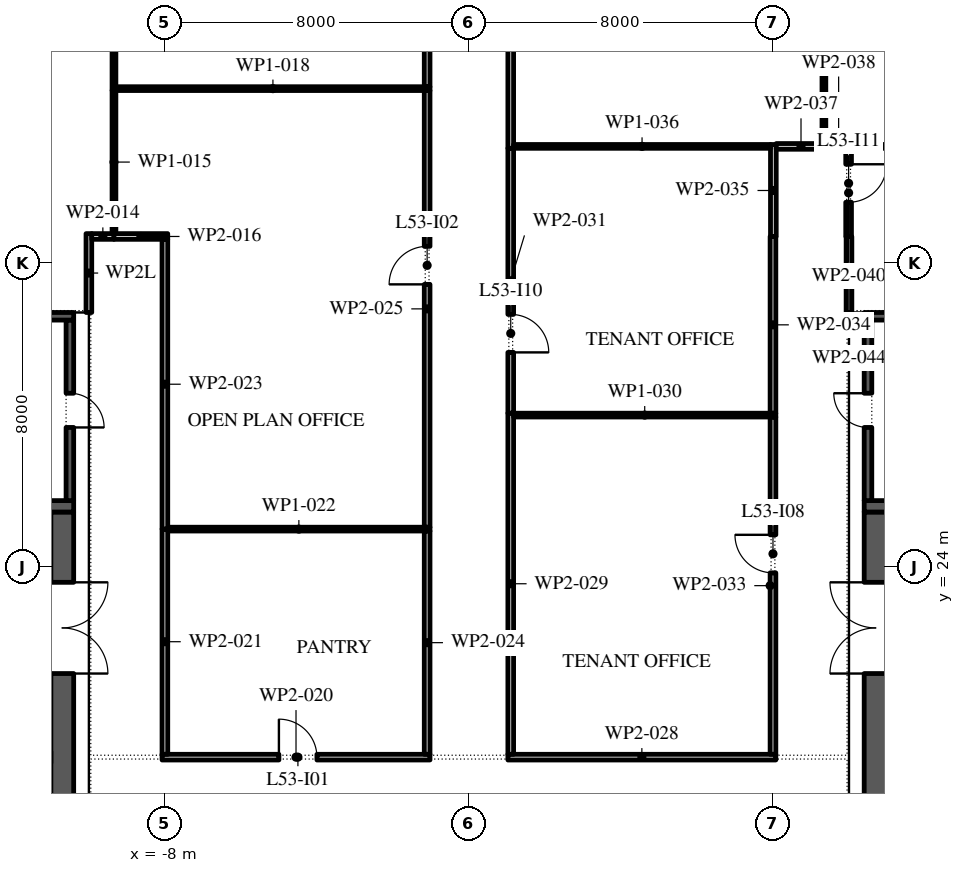
"""IFC4 building model, lengths in metres.
Left out: names, types, materials, properties, quantities, classifications, styles, units other than length and angle.
Written with IfcOpenShell. Run it as: python <this file> out.ifc"""

import sys

from ifc_helpers import new_model, si_unit, direction, frame, frame_2d, origin, place, context, subcontext, project, spatial, rectangle, extrude, element, fill, save


model = new_model("IFC4")
c1 = context("Model", 3, precision=1e-05, world=origin(), true_north=direction((0.0, 1.0)))
c2 = subcontext(c1, "Body", "Model", "MODEL_VIEW")
j1 = project(units=[si_unit("LENGTHUNIT", "METRE"), si_unit("PLANEANGLEUNIT", "RADIAN")], contexts=[c1])
p1 = place(None, origin())
s1 = spatial("IfcSite", under=j1, at=p1, CompositionType="ELEMENT")
p2 = place(p1, origin())
s2 = spatial("IfcBuilding", under=s1, at=p2, CompositionType="ELEMENT")
p3 = place(p2, frame((0.0, 0.0, 247.2)))
s3 = spatial("IfcBuildingStorey", under=s2, at=p3, CompositionType="ELEMENT", Elevation=247.2)
p4 = place(p3, frame((-10.7, -2.45, 0.0), z_axis=(0.0, 0.0, 1.0), x_axis=(0.0, 1.0, 0.0)))
e1 = element("IfcWall", 1, at=p4, inside=s3, PredefinedType="SHEAR", context=c2, shape_type="SweptSolid", body=[
    extrude(rectangle(XDim=27.9, YDim=0.6, at=frame_2d((13.95, 0.0))), origin(), (0.0, 0.0, 1.0), 4.0),
])
p5 = place(p4, frame((23.65, 0.0, 0.0)))
e2 = element("IfcOpeningElement", 2, at=p5, cuts=e1, PredefinedType="OPENING", context=c2, shape_type="SweptSolid", body=[
    extrude(rectangle(XDim=2.4, YDim=2.1, at=frame_2d((1.2, 1.05))), frame((0.0, 0.31, 0.0), z_axis=(0.0, -1.0, 0.0), x_axis=(1.0, 0.0, 0.0)), (0.0, 0.0, 1.0), 0.62),
])
p6 = place(p4, frame((1.087, 0.0, 0.0)))
e3 = element("IfcOpeningElement", 3, at=p6, cuts=e1, PredefinedType="OPENING", context=c2, shape_type="SweptSolid", body=[
    extrude(rectangle(XDim=0.9, YDim=2.1, at=frame_2d((0.45, 1.05))), frame((0.0, 0.31, 0.0), z_axis=(0.0, -1.0, 0.0), x_axis=(1.0, 0.0, 0.0)), (0.0, 0.0, 1.0), 0.62),
])
p7 = place(p4, frame((4.262, 0.0, 0.0)))
e4 = element("IfcOpeningElement", 4, at=p7, cuts=e1, PredefinedType="OPENING", context=c2, shape_type="SweptSolid", body=[
    extrude(rectangle(XDim=1.0, YDim=2.1, at=frame_2d((0.5, 1.05))), frame((0.0, 0.31, 0.0), z_axis=(0.0, -1.0, 0.0), x_axis=(1.0, 0.0, 0.0)), (0.0, 0.0, 1.0), 0.62),
])
p8 = place(p3, frame((-21.6, 25.6, 0.0), z_axis=(0.0, 0.0, 1.0), x_axis=(1.0, 0.0, 0.0)))
e5 = element("IfcWall", 5, at=p8, inside=s3, PredefinedType="SHEAR", context=c2, shape_type="SweptSolid", body=[
    extrude(rectangle(XDim=11.2, YDim=0.3, at=frame_2d((5.6, 0.0))), origin(), (0.0, 0.0, 1.0), 4.0),
])
p9 = place(p3, frame((-10.5, 25.75, 0.0), z_axis=(0.0, 0.0, 1.0), x_axis=(0.0, 1.0, 0.0)))
e6 = element("IfcWall", 6, at=p9, inside=s3, PredefinedType="SHEAR", context=c2, shape_type="SweptSolid", body=[
    extrude(rectangle(XDim=4.75, YDim=0.2, at=frame_2d((2.375, 0.0))), origin(), (0.0, 0.0, 1.0), 4.0),
])
p10 = place(p9, frame((1.925, 0.0, 0.0)))
e7 = element("IfcOpeningElement", 7, at=p10, cuts=e6, PredefinedType="OPENING", context=c2, shape_type="SweptSolid", body=[
    extrude(rectangle(XDim=0.9, YDim=2.1, at=frame_2d((0.45, 1.05))), frame((0.0, 0.11, 0.0), z_axis=(0.0, -1.0, 0.0), x_axis=(1.0, 0.0, 0.0)), (0.0, 0.0, 1.0), 0.22),
])
p11 = place(p3, frame((-21.6, 30.6, 0.0), z_axis=(0.0, 0.0, 1.0), x_axis=(1.0, 0.0, 0.0)))
e8 = element("IfcWall", 8, at=p11, inside=s3, PredefinedType="SHEAR", context=c2, shape_type="SweptSolid", body=[
    extrude(rectangle(XDim=11.2, YDim=0.2, at=frame_2d((5.6, 0.0))), origin(), (0.0, 0.0, 1.0), 4.0),
])
p12 = place(p3, frame((10.7, -2.45, 0.0), z_axis=(0.0, 0.0, 1.0), x_axis=(0.0, 1.0, 0.0)))
e9 = element("IfcWall", 9, at=p12, inside=s3, PredefinedType="SHEAR", context=c2, shape_type="SweptSolid", body=[
    extrude(rectangle(XDim=27.9, YDim=0.6, at=frame_2d((13.95, 0.0))), origin(), (0.0, 0.0, 1.0), 4.0),
])
p13 = place(p12, frame((23.65, 0.0, 0.0)))
e10 = element("IfcOpeningElement", 10, at=p13, cuts=e9, PredefinedType="OPENING", context=c2, shape_type="SweptSolid", body=[
    extrude(rectangle(XDim=2.4, YDim=2.1, at=frame_2d((1.2, 1.05))), frame((0.0, 0.31, 0.0), z_axis=(0.0, -1.0, 0.0), x_axis=(1.0, 0.0, 0.0)), (0.0, 0.0, 1.0), 0.62),
])
p14 = place(p12, frame((1.087, 0.0, 0.0)))
e11 = element("IfcOpeningElement", 11, at=p14, cuts=e9, PredefinedType="OPENING", context=c2, shape_type="SweptSolid", body=[
    extrude(rectangle(XDim=0.9, YDim=2.1, at=frame_2d((0.45, 1.05))), frame((0.0, 0.31, 0.0), z_axis=(0.0, -1.0, 0.0), x_axis=(1.0, 0.0, 0.0)), (0.0, 0.0, 1.0), 0.62),
])
p15 = place(p12, frame((4.262, 0.0, 0.0)))
e12 = element("IfcOpeningElement", 12, at=p15, cuts=e9, PredefinedType="OPENING", context=c2, shape_type="SweptSolid", body=[
    extrude(rectangle(XDim=1.0, YDim=2.1, at=frame_2d((0.5, 1.05))), frame((0.0, 0.31, 0.0), z_axis=(0.0, -1.0, 0.0), x_axis=(1.0, 0.0, 0.0)), (0.0, 0.0, 1.0), 0.62),
])
p16 = place(p3, frame((10.4, 25.6, 0.0), z_axis=(0.0, 0.0, 1.0), x_axis=(1.0, 0.0, 0.0)))
e13 = element("IfcWall", 13, at=p16, inside=s3, PredefinedType="SHEAR", context=c2, shape_type="SweptSolid", body=[
    extrude(rectangle(XDim=11.2, YDim=0.3, at=frame_2d((5.6, 0.0))), origin(), (0.0, 0.0, 1.0), 4.0),
])
p17 = place(p3, frame((10.5, 25.75, 0.0), z_axis=(0.0, 0.0, 1.0), x_axis=(0.0, 1.0, 0.0)))
e14 = element("IfcWall", 14, at=p17, inside=s3, PredefinedType="SHEAR", context=c2, shape_type="SweptSolid", body=[
    extrude(rectangle(XDim=4.75, YDim=0.2, at=frame_2d((2.375, 0.0))), origin(), (0.0, 0.0, 1.0), 4.0),
])
p18 = place(p17, frame((1.925, 0.0, 0.0)))
e15 = element("IfcOpeningElement", 15, at=p18, cuts=e14, PredefinedType="OPENING", context=c2, shape_type="SweptSolid", body=[
    extrude(rectangle(XDim=0.9, YDim=2.1, at=frame_2d((0.45, 1.05))), frame((0.0, 0.11, 0.0), z_axis=(0.0, -1.0, 0.0), x_axis=(1.0, 0.0, 0.0)), (0.0, 0.0, 1.0), 0.22),
])
p19 = place(p3, frame((10.4, 30.6, 0.0), z_axis=(0.0, 0.0, 1.0), x_axis=(1.0, 0.0, 0.0)))
e16 = element("IfcWall", 16, at=p19, inside=s3, PredefinedType="SHEAR", context=c2, shape_type="SweptSolid", body=[
    extrude(rectangle(XDim=11.2, YDim=0.2, at=frame_2d((5.6, 0.0))), origin(), (0.0, 0.0, 1.0), 4.0),
])
p20 = place(p3, frame((-10.0, 30.7, 0.0), z_axis=(0.0, 0.0, 1.0), x_axis=(0.0, 1.0, 0.0)))
e17 = element("IfcWall", 17, at=p20, inside=s3, PredefinedType="PARTITIONING", context=c2, shape_type="SweptSolid", body=[
    extrude(rectangle(XDim=2.075, YDim=0.15, at=frame_2d((1.038, 0.0))), origin(), (0.0, 0.0, 1.0), 3.02),
])
p21 = place(p3, frame((-9.925, 32.7, 0.0), z_axis=(0.0, 0.0, 1.0), x_axis=(1.0, 0.0, 0.0)))
e18 = element("IfcWall", 18, at=p21, inside=s3, PredefinedType="PARTITIONING", context=c2, shape_type="SweptSolid", body=[
    extrude(rectangle(XDim=0.585, YDim=0.15, at=frame_2d((0.292, 0.0))), origin(), (0.0, 0.0, 1.0), 4.0),
])
p22 = place(p3, frame((-9.34, 32.775, 0.0), z_axis=(0.0, 0.0, 1.0), x_axis=(0.0, 1.0, 0.0)))
e19 = element("IfcWall", 19, at=p22, inside=s3, PredefinedType="PARTITIONING", context=c2, shape_type="SweptSolid", body=[
    extrude(rectangle(XDim=3.765, YDim=0.1, at=frame_2d((1.883, 0.0))), origin(), (0.0, 0.0, 1.0), 4.0),
])
p23 = place(p3, frame((-9.34, 32.7, 0.0), z_axis=(0.0, 0.0, 1.0), x_axis=(1.0, 0.0, 0.0)))
e20 = element("IfcWall", 20, at=p23, inside=s3, PredefinedType="PARTITIONING", context=c2, shape_type="SweptSolid", body=[
    extrude(rectangle(XDim=1.415, YDim=0.15, at=frame_2d((0.708, 0.0))), origin(), (0.0, 0.0, 1.0), 4.0),
])
p24 = place(p3, frame((-9.34, 36.54, 0.0), z_axis=(0.0, 0.0, 1.0), x_axis=(0.0, 1.0, 0.0)))
e21 = element("IfcWall", 21, at=p24, inside=s3, PredefinedType="PARTITIONING", context=c2, shape_type="SweptSolid", body=[
    extrude(rectangle(XDim=5.41, YDim=0.1, at=frame_2d((2.705, 0.0))), origin(), (0.0, 0.0, 1.0), 4.0),
])
p25 = place(p3, frame((-9.29, 36.59, 0.0), z_axis=(0.0, 0.0, 1.0), x_axis=(1.0, 0.0, 0.0)))
e22 = element("IfcWall", 22, at=p25, inside=s3, PredefinedType="PARTITIONING", context=c2, shape_type="SweptSolid", body=[
    extrude(rectangle(XDim=8.265, YDim=0.1, at=frame_2d((4.133, 0.0))), origin(), (0.0, 0.0, 1.0), 4.0),
])
p26 = place(p3, frame((-8.075, 19.0, 0.0), z_axis=(0.0, 0.0, 1.0), x_axis=(1.0, 0.0, 0.0)))
e23 = element("IfcWall", 23, at=p26, inside=s3, PredefinedType="PARTITIONING", context=c2, shape_type="SweptSolid", body=[
    extrude(rectangle(XDim=7.05, YDim=0.15, at=frame_2d((3.525, 0.0))), origin(), (0.0, 0.0, 1.0), 4.0),
])
p27 = place(p26, frame((3.075, 0.0, 0.0)))
e24 = element("IfcOpeningElement", 24, at=p27, cuts=e23, PredefinedType="OPENING", context=c2, shape_type="SweptSolid", body=[
    extrude(rectangle(XDim=1.0, YDim=2.1, at=frame_2d((0.5, 1.05))), frame((0.0, 0.085, 0.0), z_axis=(0.0, -1.0, 0.0), x_axis=(1.0, 0.0, 0.0)), (0.0, 0.0, 1.0), 0.17),
])
p28 = place(p3, frame((-8.0, 25.0, 0.0), z_axis=(0.0, 0.0, 1.0), x_axis=(0.0, -1.0, 0.0)))
e25 = element("IfcWall", 25, at=p28, inside=s3, PredefinedType="PARTITIONING", context=c2, shape_type="SweptSolid", body=[
    extrude(rectangle(XDim=5.925, YDim=0.15, at=frame_2d((2.962, 0.0))), origin(), (0.0, 0.0, 1.0), 4.0),
])
p29 = place(p3, frame((-7.925, 25.0, 0.0), z_axis=(0.0, 0.0, 1.0), x_axis=(1.0, 0.0, 0.0)))
e26 = element("IfcWall", 26, at=p29, inside=s3, PredefinedType="PARTITIONING", context=c2, shape_type="SweptSolid", body=[
    extrude(rectangle(XDim=6.9, YDim=0.1, at=frame_2d((3.45, 0.0))), origin(), (0.0, 0.0, 1.0), 4.0),
])
p30 = place(p3, frame((-8.0, 32.625, 0.0), z_axis=(0.0, 0.0, 1.0), x_axis=(0.0, -1.0, 0.0)))
e27 = element("IfcWall", 27, at=p30, inside=s3, PredefinedType="PARTITIONING", context=c2, shape_type="SweptSolid", body=[
    extrude(rectangle(XDim=7.625, YDim=0.15, at=frame_2d((3.812, 0.0))), origin(), (0.0, 0.0, 1.0), 4.0),
])
p31 = place(p3, frame((-1.1, 19.075, 0.0), z_axis=(0.0, 0.0, 1.0), x_axis=(0.0, 1.0, 0.0)))
e28 = element("IfcWall", 28, at=p31, inside=s3, PredefinedType="PARTITIONING", context=c2, shape_type="SweptSolid", body=[
    extrude(rectangle(XDim=5.875, YDim=0.15, at=frame_2d((2.938, 0.0))), origin(), (0.0, 0.0, 1.0), 4.0),
])
p32 = place(p3, frame((-1.1, 25.05, 0.0), z_axis=(0.0, 0.0, 1.0), x_axis=(0.0, 1.0, 0.0)))
e29 = element("IfcWall", 29, at=p32, inside=s3, PredefinedType="PARTITIONING", context=c2, shape_type="SweptSolid", body=[
    extrude(rectangle(XDim=11.49, YDim=0.15, at=frame_2d((5.745, 0.0))), origin(), (0.0, 0.0, 1.0), 4.0),
])
p33 = place(p32, frame((6.39, 0.0, 0.0)))
e30 = element("IfcOpeningElement", 30, at=p33, cuts=e29, PredefinedType="OPENING", context=c2, shape_type="SweptSolid", body=[
    extrude(rectangle(XDim=1.0, YDim=2.1, at=frame_2d((0.5, 1.05))), frame((0.0, 0.085, 0.0), z_axis=(0.0, -1.0, 0.0), x_axis=(1.0, 0.0, 0.0)), (0.0, 0.0, 1.0), 0.17),
])
p34 = place(p3, frame((-1.1, 36.64, 0.0), z_axis=(0.0, 0.0, 1.0), x_axis=(0.0, 1.0, 0.0)))
e31 = element("IfcWall", 31, at=p34, inside=s3, PredefinedType="PARTITIONING", context=c2, shape_type="SweptSolid", body=[
    extrude(rectangle(XDim=11.138, YDim=0.15, at=frame_2d((5.569, 0.0))), origin(), (0.0, 0.0, 1.0), 4.0),
])
p35 = place(p34, frame((6.21, 0.0, 0.0)))
e32 = element("IfcOpeningElement", 32, at=p35, cuts=e31, PredefinedType="OPENING", context=c2, shape_type="SweptSolid", body=[
    extrude(rectangle(XDim=1.0, YDim=2.1, at=frame_2d((0.5, 1.05))), frame((0.0, 0.085, 0.0), z_axis=(0.0, -1.0, 0.0), x_axis=(1.0, 0.0, 0.0)), (0.0, 0.0, 1.0), 0.17),
])
p36 = place(p3, frame((1.025, 19.0, 0.0), z_axis=(0.0, 0.0, 1.0), x_axis=(1.0, 0.0, 0.0)))
e33 = element("IfcWall", 33, at=p36, inside=s3, PredefinedType="PARTITIONING", context=c2, shape_type="SweptSolid", body=[
    extrude(rectangle(XDim=7.05, YDim=0.15, at=frame_2d((3.525, 0.0))), origin(), (0.0, 0.0, 1.0), 4.0),
])
p37 = place(p3, frame((1.1, 28.05, 0.0), z_axis=(0.0, 0.0, 1.0), x_axis=(0.0, -1.0, 0.0)))
e34 = element("IfcWall", 34, at=p37, inside=s3, PredefinedType="PARTITIONING", context=c2, shape_type="SweptSolid", body=[
    extrude(rectangle(XDim=8.975, YDim=0.15, at=frame_2d((4.488, 0.0))), origin(), (0.0, 0.0, 1.0), 4.0),
])
p38 = place(p3, frame((1.175, 28.0, 0.0), z_axis=(0.0, 0.0, 1.0), x_axis=(1.0, 0.0, 0.0)))
e35 = element("IfcWall", 35, at=p38, inside=s3, PredefinedType="PARTITIONING", context=c2, shape_type="SweptSolid", body=[
    extrude(rectangle(XDim=6.9, YDim=0.1, at=frame_2d((3.45, 0.0))), origin(), (0.0, 0.0, 1.0), 4.0),
])
p39 = place(p3, frame((1.1, 35.02, 0.0), z_axis=(0.0, 0.0, 1.0), x_axis=(0.0, -1.0, 0.0)))
e36 = element("IfcWall", 36, at=p39, inside=s3, PredefinedType="PARTITIONING", context=c2, shape_type="SweptSolid", body=[
    extrude(rectangle(XDim=6.97, YDim=0.15, at=frame_2d((3.485, 0.0))), origin(), (0.0, 0.0, 1.0), 4.0),
])
p40 = place(p39, frame((4.37, 0.0, 0.0)))
e37 = element("IfcOpeningElement", 37, at=p40, cuts=e36, PredefinedType="OPENING", context=c2, shape_type="SweptSolid", body=[
    extrude(rectangle(XDim=1.0, YDim=2.1, at=frame_2d((0.5, 1.05))), frame((0.0, 0.085, 0.0), z_axis=(0.0, -1.0, 0.0), x_axis=(1.0, 0.0, 0.0)), (0.0, 0.0, 1.0), 0.17),
])
p41 = place(p3, frame((1.1, 47.27, 0.0), z_axis=(0.0, 0.0, 1.0), x_axis=(0.0, -1.0, 0.0)))
e38 = element("IfcWall", 38, at=p41, inside=s3, PredefinedType="PARTITIONING", context=c2, shape_type="SweptSolid", body=[
    extrude(rectangle(XDim=12.25, YDim=0.15, at=frame_2d((6.125, 0.0))), origin(), (0.0, 0.0, 1.0), 4.0),
])
p42 = place(p41, frame((8.05, 0.0, 0.0)))
e39 = element("IfcOpeningElement", 39, at=p42, cuts=e38, PredefinedType="OPENING", context=c2, shape_type="SweptSolid", body=[
    extrude(rectangle(XDim=1.0, YDim=2.1, at=frame_2d((0.5, 1.05))), frame((0.0, 0.085, 0.0), z_axis=(0.0, -1.0, 0.0), x_axis=(1.0, 0.0, 0.0)), (0.0, 0.0, 1.0), 0.17),
])
p43 = place(p3, frame((8.0, 19.075, 0.0), z_axis=(0.0, 0.0, 1.0), x_axis=(0.0, 1.0, 0.0)))
e40 = element("IfcWall", 40, at=p43, inside=s3, PredefinedType="PARTITIONING", context=c2, shape_type="SweptSolid", body=[
    extrude(rectangle(XDim=8.875, YDim=0.15, at=frame_2d((4.438, 0.0))), origin(), (0.0, 0.0, 1.0), 4.0),
])
p44 = place(p43, frame((4.775, 0.0, 0.0)))
e41 = element("IfcOpeningElement", 41, at=p44, cuts=e40, PredefinedType="OPENING", context=c2, shape_type="SweptSolid", body=[
    extrude(rectangle(XDim=1.0, YDim=2.1, at=frame_2d((0.5, 1.05))), frame((0.0, 0.085, 0.0), z_axis=(0.0, -1.0, 0.0), x_axis=(1.0, 0.0, 0.0)), (0.0, 0.0, 1.0), 0.17),
])
p45 = place(p3, frame((8.0, 28.05, 0.0), z_axis=(0.0, 0.0, 1.0), x_axis=(0.0, 1.0, 0.0)))
e42 = element("IfcWall", 42, at=p45, inside=s3, PredefinedType="PARTITIONING", context=c2, shape_type="SweptSolid", body=[
    extrude(rectangle(XDim=4.65, YDim=0.15, at=frame_2d((2.325, 0.0))), origin(), (0.0, 0.0, 1.0), 4.0),
])
p46 = place(p3, frame((8.01, 32.7, 0.0), z_axis=(0.0, 0.0, 1.0), x_axis=(0.0, 1.0, 0.0)))
e43 = element("IfcWall", 43, at=p46, inside=s3, PredefinedType="PARTITIONING", context=c2, shape_type="SweptSolid", body=[
    extrude(rectangle(XDim=2.42, YDim=0.15, at=frame_2d((1.21, 0.0))), origin(), (0.0, 0.0, 1.0), 4.0),
])
p47 = place(p3, frame((7.935, 35.07, 0.0), z_axis=(0.0, 0.0, 1.0), x_axis=(-1.0, 0.0, 0.0)))
e44 = element("IfcWall", 44, at=p47, inside=s3, PredefinedType="PARTITIONING", context=c2, shape_type="SweptSolid", body=[
    extrude(rectangle(XDim=6.76, YDim=0.1, at=frame_2d((3.38, 0.0))), origin(), (0.0, 0.0, 1.0), 4.0),
])
p48 = place(p3, frame((8.085, 35.07, 0.0), z_axis=(0.0, 0.0, 1.0), x_axis=(1.0, 0.0, 0.0)))
e45 = element("IfcWall", 45, at=p48, inside=s3, PredefinedType="PARTITIONING", context=c2, shape_type="SweptSolid", body=[
    extrude(rectangle(XDim=1.305, YDim=0.15, at=frame_2d((0.652, 0.0))), origin(), (0.0, 0.0, 1.0), 4.0),
])
p49 = place(p3, frame((9.39, 35.07, 0.0), z_axis=(0.0, 0.0, 1.0), x_axis=(1.0, 0.0, 0.0)))
e46 = element("IfcWall", 46, at=p49, inside=s3, PredefinedType="PARTITIONING", context=c2, shape_type="SweptSolid", body=[
    extrude(rectangle(XDim=0.675, YDim=0.15, at=frame_2d((0.337, 0.0))), origin(), (0.0, 0.0, 1.0), 4.0),
])
p50 = place(p3, frame((9.34, 45.368, 0.0), z_axis=(0.0, 0.0, 1.0), x_axis=(0.0, -1.0, 0.0)))
e47 = element("IfcWall", 47, at=p50, inside=s3, PredefinedType="PARTITIONING", context=c2, shape_type="SweptSolid", body=[
    extrude(rectangle(XDim=10.223, YDim=0.1, at=frame_2d((5.111, 0.0))), origin(), (0.0, 0.0, 1.0), 4.0),
])
p51 = place(p50, frame((6.698, 0.0, 0.0)))
e48 = element("IfcOpeningElement", 48, at=p51, cuts=e47, PredefinedType="OPENING", context=c2, shape_type="SweptSolid", body=[
    extrude(rectangle(XDim=0.9, YDim=2.1, at=frame_2d((0.45, 1.05))), frame((0.0, 0.06, 0.0), z_axis=(0.0, -1.0, 0.0), x_axis=(1.0, 0.0, 0.0)), (0.0, 0.0, 1.0), 0.12),
])
p52 = place(p3, frame((9.99, 34.995, 0.0), z_axis=(0.0, 0.0, 1.0), x_axis=(0.0, -1.0, 0.0)))
e49 = element("IfcWall", 49, at=p52, inside=s3, PredefinedType="PARTITIONING", context=c2, shape_type="SweptSolid", body=[
    extrude(rectangle(XDim=2.295, YDim=0.15, at=frame_2d((1.147, 0.0))), origin(), (0.0, 0.0, 1.0), 4.0),
])
p53 = place(p52, frame((0.395, 0.0, 0.0)))
e50 = element("IfcOpeningElement", 50, at=p53, cuts=e49, PredefinedType="OPENING", context=c2, shape_type="SweptSolid", body=[
    extrude(rectangle(XDim=1.0, YDim=2.1, at=frame_2d((0.5, 1.05))), frame((0.0, 0.085, 0.0), z_axis=(0.0, -1.0, 0.0), x_axis=(1.0, 0.0, 0.0)), (0.0, 0.0, 1.0), 0.17),
])
p54 = place(p3, frame((10.065, 35.07, 0.0), z_axis=(0.0, 0.0, 1.0), x_axis=(1.0, 0.0, 0.0)))
e51 = element("IfcWall", 51, at=p54, inside=s3, PredefinedType="PARTITIONING", context=c2, shape_type="SweptSolid", body=[
    extrude(rectangle(XDim=6.485, YDim=0.1, at=frame_2d((3.243, 0.0))), origin(), (0.0, 0.0, 1.0), 4.0),
])
p55 = place(p3, frame((10.0, 32.7, 0.0), z_axis=(0.0, 0.0, 1.0), x_axis=(0.0, -1.0, 0.0)))
e52 = element("IfcWall", 52, at=p55, inside=s3, PredefinedType="PARTITIONING", context=c2, shape_type="SweptSolid", body=[
    extrude(rectangle(XDim=2.0, YDim=0.15, at=frame_2d((1.0, 0.0))), origin(), (0.0, 0.0, 1.0), 4.0),
])
p56 = place(p5, frame((2.4, 0.0, 0.0), z_axis=(0.0, 0.0, 1.0), x_axis=(-1.0, 0.0, 0.0)))
e53 = element("IfcDoor", 53, at=p56, inside=s3, OperationType="DOUBLE_DOOR_SINGLE_SWING", PredefinedType="DOOR", context=c2, shape_type="SweptSolid", body=[
    extrude(rectangle(XDim=2.4, YDim=2.1, at=frame_2d((1.2, 1.05))), frame((0.0, 0.025, 0.0), z_axis=(0.0, -1.0, 0.0), x_axis=(1.0, 0.0, 0.0)), (0.0, 0.0, 1.0), 0.05),
])
fill(e2, e53)
p57 = place(p10, frame((0.9, 0.15, 0.0), z_axis=(0.0, 0.0, 1.0), x_axis=(-1.0, 0.0, 0.0)))
e54 = element("IfcDoor", 54, at=p57, inside=s3, OperationType="SINGLE_SWING_LEFT", PredefinedType="DOOR", context=c2, shape_type="SweptSolid", body=[
    extrude(rectangle(XDim=0.9, YDim=2.1, at=frame_2d((0.45, 1.05))), frame((0.0, 0.1, 0.0), z_axis=(0.0, -1.0, 0.0), x_axis=(1.0, 0.0, 0.0)), (0.0, 0.0, 1.0), 0.05),
])
fill(e7, e54)
p58 = place(p13, origin())
e55 = element("IfcDoor", 55, at=p58, inside=s3, OperationType="DOUBLE_DOOR_SINGLE_SWING", PredefinedType="DOOR", context=c2, shape_type="SweptSolid", body=[
    extrude(rectangle(XDim=2.4, YDim=2.1, at=frame_2d((1.2, 1.05))), frame((0.0, 0.025, 0.0), z_axis=(0.0, -1.0, 0.0), x_axis=(1.0, 0.0, 0.0)), (0.0, 0.0, 1.0), 0.05),
])
fill(e10, e55)
p59 = place(p18, origin())
e56 = element("IfcDoor", 56, at=p59, inside=s3, OperationType="SINGLE_SWING_LEFT", PredefinedType="DOOR", context=c2, shape_type="SweptSolid", body=[
    extrude(rectangle(XDim=0.9, YDim=2.1, at=frame_2d((0.45, 1.05))), frame((0.0, -0.05, 0.0), z_axis=(0.0, -1.0, 0.0), x_axis=(1.0, 0.0, 0.0)), (0.0, 0.0, 1.0), 0.05),
])
fill(e15, e56)
p60 = place(p27, origin())
e57 = element("IfcDoor", 57, at=p60, inside=s3, OperationType="SINGLE_SWING_RIGHT", PredefinedType="DOOR", context=c2, shape_type="SweptSolid", body=[
    extrude(rectangle(XDim=1.0, YDim=2.1, at=frame_2d((0.5, 1.05))), frame((0.0, 0.025, 0.0), z_axis=(0.0, -1.0, 0.0), x_axis=(1.0, 0.0, 0.0)), (0.0, 0.0, 1.0), 0.05),
])
fill(e24, e57)
p61 = place(p33, origin())
e58 = element("IfcDoor", 58, at=p61, inside=s3, OperationType="SINGLE_SWING_RIGHT", PredefinedType="DOOR", context=c2, shape_type="SweptSolid", body=[
    extrude(rectangle(XDim=1.0, YDim=2.1, at=frame_2d((0.5, 1.05))), frame((0.0, 0.025, 0.0), z_axis=(0.0, -1.0, 0.0), x_axis=(1.0, 0.0, 0.0)), (0.0, 0.0, 1.0), 0.05),
])
fill(e30, e58)
p62 = place(p44, origin())
e59 = element("IfcDoor", 59, at=p62, inside=s3, OperationType="SINGLE_SWING_LEFT", PredefinedType="DOOR", context=c2, shape_type="SweptSolid", body=[
    extrude(rectangle(XDim=1.0, YDim=2.1, at=frame_2d((0.5, 1.05))), frame((0.0, 0.025, 0.0), z_axis=(0.0, -1.0, 0.0), x_axis=(1.0, 0.0, 0.0)), (0.0, 0.0, 1.0), 0.05),
])
fill(e41, e59)
p63 = place(p40, origin())
e60 = element("IfcDoor", 60, at=p63, inside=s3, OperationType="SINGLE_SWING_LEFT", PredefinedType="DOOR", context=c2, shape_type="SweptSolid", body=[
    extrude(rectangle(XDim=1.0, YDim=2.1, at=frame_2d((0.5, 1.05))), frame((0.0, 0.025, 0.0), z_axis=(0.0, -1.0, 0.0), x_axis=(1.0, 0.0, 0.0)), (0.0, 0.0, 1.0), 0.05),
])
fill(e37, e60)
p64 = place(p53, origin())
e61 = element("IfcDoor", 61, at=p64, inside=s3, OperationType="SINGLE_SWING_RIGHT", PredefinedType="DOOR", context=c2, shape_type="SweptSolid", body=[
    extrude(rectangle(XDim=1.0, YDim=2.1, at=frame_2d((0.5, 1.05))), frame((0.0, 0.025, 0.0), z_axis=(0.0, -1.0, 0.0), x_axis=(1.0, 0.0, 0.0)), (0.0, 0.0, 1.0), 0.05),
])
fill(e50, e61)
save(model, sys.argv[1])
